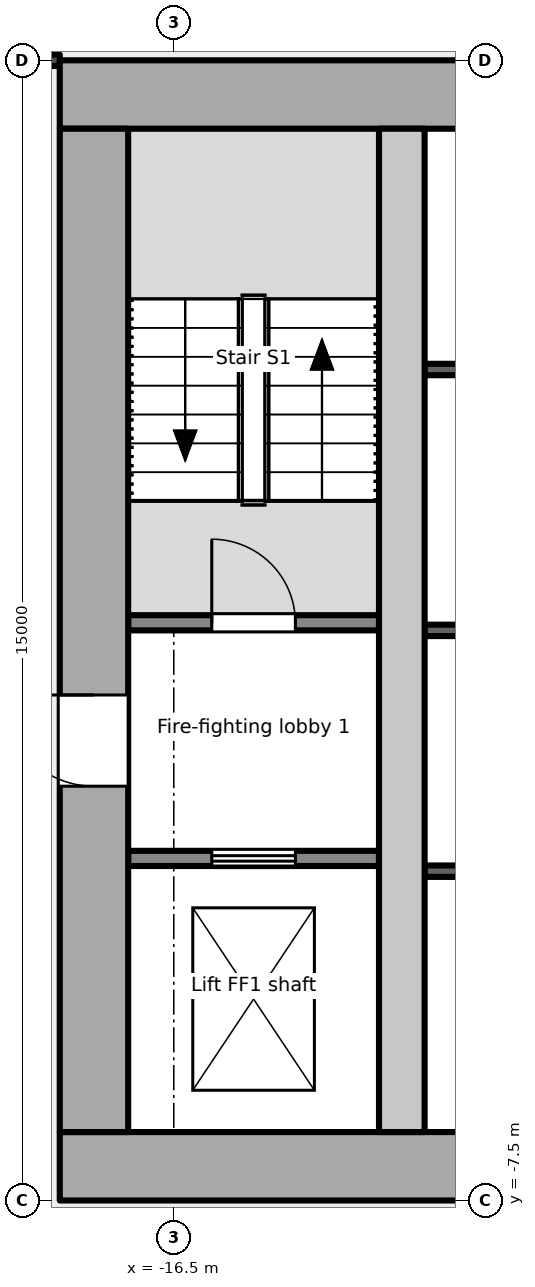
"""IFC4 building model, lengths in metres.
Left out: names, types, materials, properties, quantities, classifications, styles, units other than length and angle.
Written with IfcOpenShell. Run it as: python <this file> out.ifc"""

import sys

from ifc_helpers import new_model, si_unit, direction, frame, frame_2d, origin, place, context, subcontext, project, spatial, rectangle, extrude, element, fill, save


model = new_model("IFC4")
c1 = context("Model", 3, precision=1e-05, world=origin(), true_north=direction((0.0, 1.0)))
c2 = subcontext(c1, "Body", "Model", "MODEL_VIEW")
j1 = project(units=[si_unit("LENGTHUNIT", "METRE"), si_unit("PLANEANGLEUNIT", "RADIAN")], contexts=[c1])
p1 = place(None, origin())
s1 = spatial("IfcSite", under=j1, at=p1, CompositionType="ELEMENT")
p2 = place(p1, origin())
s2 = spatial("IfcBuilding", under=s1, at=p2, CompositionType="ELEMENT")
p3 = place(p2, frame((0.0, 0.0, 208.1)))
s3 = spatial("IfcBuildingStorey", under=s2, at=p3, CompositionType="ELEMENT", Elevation=208.1)
p4 = place(p3, frame((-18.0, -7.05, -0.2), z_axis=(0.0, 0.0, 1.0), x_axis=(1.0, 0.0, 0.0)))
e1 = element("IfcWall", 1, at=p4, inside=s3, PredefinedType="SHEAR", context=c2, shape_type="SweptSolid", body=[
    extrude(rectangle(XDim=36.0, YDim=0.9, at=frame_2d((18.0, 0.0))), origin(), (0.0, 0.0, 1.0), 5.4),
])
p5 = place(p4, frame((8.1, 0.0, 0.2)))
e2 = element("IfcOpeningElement", 2, at=p5, cuts=e1, PredefinedType="OPENING", context=c2, shape_type="SweptSolid", body=[
    extrude(rectangle(XDim=1.8, YDim=2.1, at=frame_2d((0.9, 1.05))), frame((0.0, 0.46, 0.0), z_axis=(0.0, -1.0, 0.0), x_axis=(1.0, 0.0, 0.0)), (0.0, 0.0, 1.0), 0.921),
])
p6 = place(p4, frame((16.8, 0.0, 0.2)))
e3 = element("IfcOpeningElement", 3, at=p6, cuts=e1, PredefinedType="OPENING", context=c2, shape_type="SweptSolid", body=[
    extrude(rectangle(XDim=2.4, YDim=2.1, at=frame_2d((1.2, 1.05))), frame((0.0, 0.46, 0.0), z_axis=(0.0, -1.0, 0.0), x_axis=(1.0, 0.0, 0.0)), (0.0, 0.0, 1.0), 0.921),
])
p7 = place(p4, frame((26.1, 0.0, 0.2)))
e4 = element("IfcOpeningElement", 4, at=p7, cuts=e1, PredefinedType="OPENING", context=c2, shape_type="SweptSolid", body=[
    extrude(rectangle(XDim=2.4, YDim=2.1, at=frame_2d((1.2, 1.05))), frame((0.0, 0.46, 0.0), z_axis=(0.0, -1.0, 0.0), x_axis=(1.0, 0.0, 0.0)), (0.0, 0.0, 1.0), 0.921),
])
p8 = place(p3, frame((-18.0, 7.05, -0.2), z_axis=(0.0, 0.0, 1.0), x_axis=(1.0, 0.0, 0.0)))
e5 = element("IfcWall", 5, at=p8, inside=s3, PredefinedType="SHEAR", context=c2, shape_type="SweptSolid", body=[
    extrude(rectangle(XDim=36.0, YDim=0.9, at=frame_2d((18.0, 0.0))), origin(), (0.0, 0.0, 1.0), 5.4),
])
p9 = place(p3, frame((-17.55, -6.6, -0.2), z_axis=(0.0, 0.0, 1.0), x_axis=(0.0, 1.0, 0.0)))
e6 = element("IfcWall", 6, at=p9, inside=s3, PredefinedType="SHEAR", context=c2, shape_type="SweptSolid", body=[
    extrude(rectangle(XDim=13.2, YDim=0.9, at=frame_2d((6.6, 0.0))), origin(), (0.0, 0.0, 1.0), 5.4),
])
p10 = place(p9, frame((4.55, 0.0, 0.2)))
e7 = element("IfcOpeningElement", 7, at=p10, cuts=e6, PredefinedType="OPENING", context=c2, shape_type="SweptSolid", body=[
    extrude(rectangle(XDim=1.2, YDim=2.1, at=frame_2d((0.6, 1.05))), frame((0.0, 0.46, 0.0), z_axis=(0.0, -1.0, 0.0), x_axis=(1.0, 0.0, 0.0)), (0.0, 0.0, 1.0), 0.921),
])
p11 = place(p3, frame((-13.5, -6.6, -0.2), z_axis=(0.0, 0.0, 1.0), x_axis=(0.0, 1.0, 0.0)))
e8 = element("IfcWall", 8, at=p11, inside=s3, PredefinedType="SHEAR", context=c2, shape_type="SweptSolid", body=[
    extrude(rectangle(XDim=13.2, YDim=0.6, at=frame_2d((6.6, 0.0))), origin(), (0.0, 0.0, 1.0), 5.4),
])
p12 = place(p3, frame((-17.1, -3.0, 0.0), z_axis=(0.0, 0.0, 1.0), x_axis=(1.0, 0.0, 0.0)))
e9 = element("IfcWall", 9, at=p12, inside=s3, PredefinedType="PARTITIONING", context=c2, shape_type="SweptSolid", body=[
    extrude(rectangle(XDim=3.3, YDim=0.2, at=frame_2d((1.65, 0.0))), origin(), (0.0, 0.0, 1.0), 5.2),
])
p13 = place(p12, frame((1.1, 0.0, 0.0)))
e10 = element("IfcOpeningElement", 10, at=p13, cuts=e9, PredefinedType="OPENING", context=c2, shape_type="SweptSolid", body=[
    extrude(rectangle(XDim=1.1, YDim=2.1, at=frame_2d((0.55, 1.05))), frame((0.0, 0.111, 0.0), z_axis=(0.0, -1.0, 0.0), x_axis=(1.0, 0.0, 0.0)), (0.0, 0.0, 1.0), 0.221),
])
p14 = place(p3, frame((-17.1, 0.1, 0.0), z_axis=(0.0, 0.0, 1.0), x_axis=(1.0, 0.0, 0.0)))
e11 = element("IfcWall", 11, at=p14, inside=s3, PredefinedType="PARTITIONING", context=c2, shape_type="SweptSolid", body=[
    extrude(rectangle(XDim=3.3, YDim=0.2, at=frame_2d((1.65, 0.0))), origin(), (0.0, 0.0, 1.0), 5.2),
])
p15 = place(p14, frame((1.1, 0.0, 0.0)))
e12 = element("IfcOpeningElement", 12, at=p15, cuts=e11, PredefinedType="OPENING", context=c2, shape_type="SweptSolid", body=[
    extrude(rectangle(XDim=1.1, YDim=2.1, at=frame_2d((0.55, 1.05))), frame((0.0, 0.111, 0.0), z_axis=(0.0, -1.0, 0.0), x_axis=(1.0, 0.0, 0.0)), (0.0, 0.0, 1.0), 0.221),
])
for number, where, z_axis, x_axis in (
    (13, (-13.2, -3.168, 0.0), (0.0, 0.0, 1.0), (1.0, 0.0, 0.0)),
    (14, (-13.2, 0.0, 0.0), (0.0, 0.0, 1.0), (1.0, 0.0, 0.0)),
    (15, (-13.2, 3.432, 0.0), (0.0, 0.0, 1.0), (1.0, 0.0, 0.0)),
):
    element("IfcWall", number, at=place(p3, frame(where, z_axis=z_axis, x_axis=x_axis)), inside=s3, PredefinedType="PARTITIONING", context=c2, shape_type="SweptSolid", body=[
        extrude(rectangle(XDim=3.05, YDim=0.15, at=frame_2d((1.525, 0.0))), origin(), (0.0, 0.0, 1.0), 5.2),
    ])
p16 = place(p3, frame((-20.431, 7.5, 0.0), z_axis=(0.0, 0.0, 1.0), x_axis=(1.0, 0.0, 0.0)))
e16 = element("IfcWall", 16, at=p16, inside=s3, PredefinedType="PARTITIONING", context=c2, shape_type="SweptSolid", body=[
    extrude(rectangle(XDim=2.431, YDim=0.15, at=frame_2d((1.215, 0.0))), origin(), (0.0, 0.0, 1.0), 5.2),
])
p17 = place(p13, origin())
e17 = element("IfcDoor", 17, at=p17, inside=s3, OperationType="DOUBLE_DOOR_SLIDING", PredefinedType="DOOR", context=c2, shape_type="SweptSolid", body=[
    extrude(rectangle(XDim=1.1, YDim=2.1, at=frame_2d((0.55, 1.05))), frame((0.0, 0.025, 0.0), z_axis=(0.0, -1.0, 0.0), x_axis=(1.0, 0.0, 0.0)), (0.0, 0.0, 1.0), 0.05),
])
fill(e10, e17)
p18 = place(p10, origin())
e18 = element("IfcDoor", 18, at=p18, inside=s3, OperationType="SINGLE_SWING_RIGHT", PredefinedType="DOOR", context=c2, shape_type="SweptSolid", body=[
    extrude(rectangle(XDim=1.2, YDim=2.1, at=frame_2d((0.6, 1.05))), frame((0.0, 0.025, 0.0), z_axis=(0.0, -1.0, 0.0), x_axis=(1.0, 0.0, 0.0)), (0.0, 0.0, 1.0), 0.05),
])
fill(e7, e18)
p19 = place(p15, origin())
e19 = element("IfcDoor", 19, at=p19, inside=s3, OperationType="SINGLE_SWING_LEFT", PredefinedType="DOOR", context=c2, shape_type="SweptSolid", body=[
    extrude(rectangle(XDim=1.1, YDim=2.1, at=frame_2d((0.55, 1.05))), frame((0.0, 0.025, 0.0), z_axis=(0.0, -1.0, 0.0), x_axis=(1.0, 0.0, 0.0)), (0.0, 0.0, 1.0), 0.05),
])
fill(e12, e19)
save(model, sys.argv[1])
